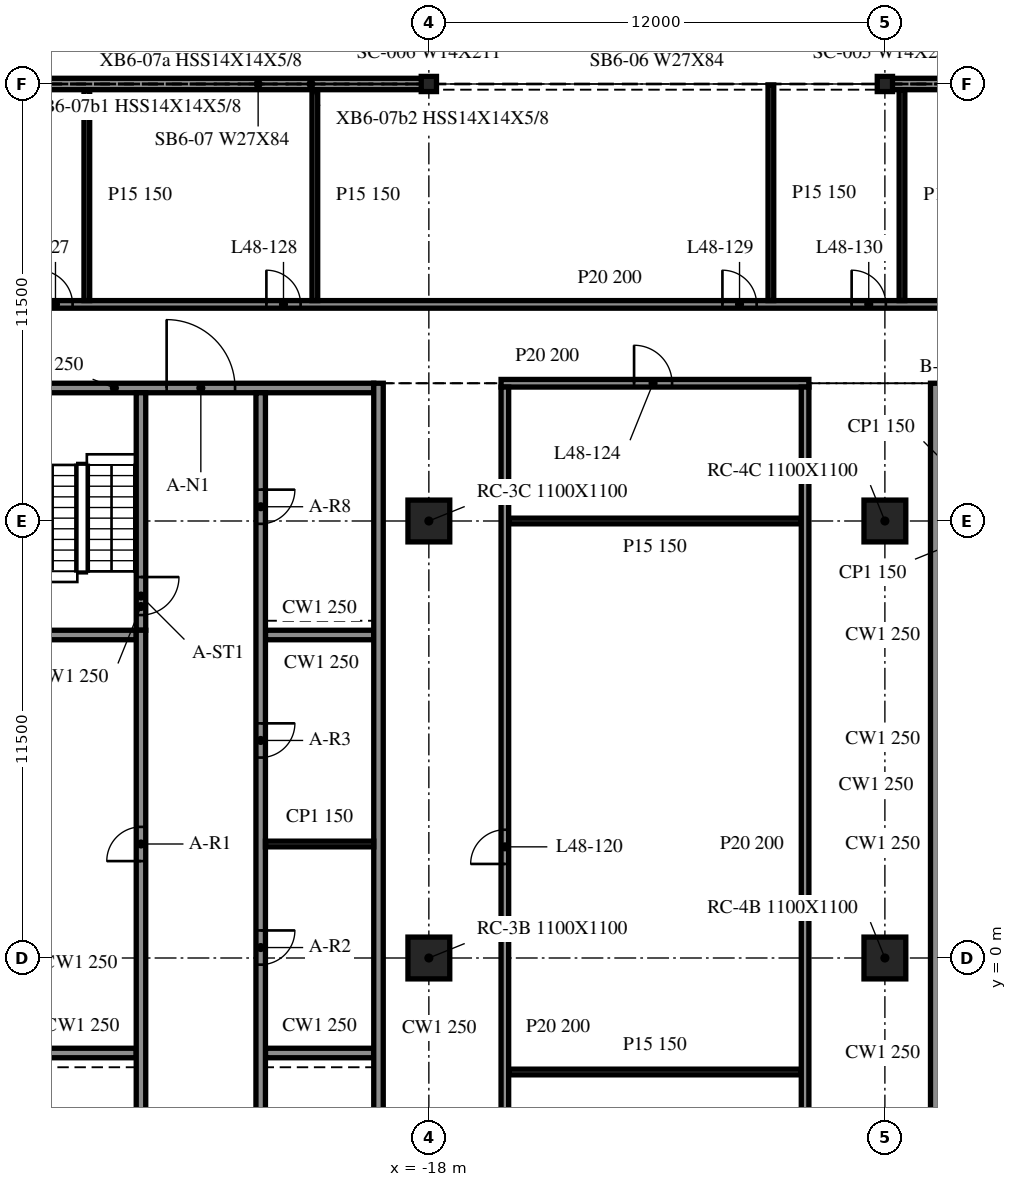
"""IFC4 building model, lengths in metres.
Left out: names, types, materials, properties, quantities, classifications, styles, units other than length and angle.
Written with IfcOpenShell. Run it as: python <this file> out.ifc"""

import sys

from ifc_helpers import new_model, si_unit, direction, frame, frame_2d, origin, origin_2d, place, context, subcontext, project, spatial, rectangle, i_section, extrude, element, fill, save


model = new_model("IFC4")
c1 = context("Model", 3, precision=1e-05, world=origin(), true_north=direction((0.0, 1.0)))
c2 = subcontext(c1, "Body", "Model", "MODEL_VIEW")
j1 = project(units=[si_unit("LENGTHUNIT", "METRE"), si_unit("PLANEANGLEUNIT", "RADIAN")], contexts=[c1])
p1 = place(None, origin())
s1 = spatial("IfcSite", under=j1, at=p1, CompositionType="ELEMENT")
p2 = place(p1, origin())
s2 = spatial("IfcBuilding", under=s1, at=p2, CompositionType="ELEMENT")
p3 = place(p2, frame((0.0, 0.0, 201.5)))
s3 = spatial("IfcBuildingStorey", under=s2, at=p3, CompositionType="ELEMENT", Elevation=201.5)
for number, where, z_axis, x_axis in (
    (1, (-18.0, 0.0, -0.34), (0.0, 0.0, 1.0), (1.0, 0.0, 0.0)),
    (2, (-18.0, 11.5, -0.34), (0.0, 0.0, 1.0), (1.0, 0.0, 0.0)),
    (3, (-6.0, 0.0, -0.34), (0.0, 0.0, 1.0), (1.0, 0.0, 0.0)),
    (4, (-6.0, 11.5, -0.34), (0.0, 0.0, 1.0), (1.0, 0.0, 0.0)),
):
    element("IfcColumn", number, at=place(p3, frame(where, z_axis=z_axis, x_axis=x_axis)), inside=s3, PredefinedType="COLUMN", context=c2, shape_type="SweptSolid", body=[
        extrude(rectangle(XDim=1.1, YDim=1.1, at=origin_2d()), origin(), (0.0, 0.0, 1.0), 3.8),
    ])
for number, where, z_axis, x_axis in (
    (5, (-6.0, 23.0, -0.34), (0.0, 0.0, 1.0), (1.0, 0.0, 0.0)),
    (6, (-18.0, 23.0, -0.34), (0.0, 0.0, 1.0), (1.0, 0.0, 0.0)),
):
    element("IfcColumn", number, at=place(p3, frame(where, z_axis=z_axis, x_axis=x_axis)), inside=s3, PredefinedType="COLUMN", context=c2, shape_type="SweptSolid", body=[
        extrude(i_section(OverallWidth=0.401, OverallDepth=0.399, WebThickness=0.025, FlangeThickness=0.04, at=origin_2d()), origin(), (0.0, 0.0, 1.0), 3.8),
    ])
for number, where, z_axis, x_axis in (
    (7, (5.988, 23.0, 0.0), (0.0, 0.0, 1.0), (-1.0, 0.0, 0.0)),
    (8, (-18.012, 23.0, 0.0), (0.0, 0.0, 1.0), (-1.0, 0.0, 0.0)),
):
    element("IfcWall", number, at=place(p3, frame(where, z_axis=z_axis, x_axis=x_axis)), inside=s3, PredefinedType="NOTDEFINED", context=c2, shape_type="SweptSolid", body=[
        extrude(rectangle(XDim=11.975, YDim=0.3, at=frame_2d((5.988, 0.0))), origin(), (0.0, 0.0, 1.0), 2.782),
    ])
p4 = place(p3, frame((-19.325, -9.125, 0.0), z_axis=(0.0, 0.0, 1.0), x_axis=(0.0, 1.0, 0.0)))
e9 = element("IfcWall", 9, at=p4, inside=s3, PredefinedType="SOLIDWALL", context=c2, shape_type="SweptSolid", body=[
    extrude(rectangle(XDim=24.25, YDim=0.25, at=frame_2d((12.125, 0.0))), origin(), (0.0, 0.0, 1.0), 3.46),
])
p5 = place(p3, frame((-28.55, 15.0, 0.0), z_axis=(0.0, 0.0, 1.0), x_axis=(1.0, 0.0, 0.0)))
e10 = element("IfcWall", 10, at=p5, inside=s3, PredefinedType="SOLIDWALL", context=c2, shape_type="SweptSolid", body=[
    extrude(rectangle(XDim=9.1, YDim=0.25, at=frame_2d((4.55, 0.0))), origin(), (0.0, 0.0, 1.0), 3.46),
])
p6 = place(p5, frame((3.65, 0.0, 0.0)))
e11 = element("IfcOpeningElement", 11, at=p6, cuts=e10, PredefinedType="OPENING", context=c2, shape_type="SweptSolid", body=[
    extrude(rectangle(XDim=1.8, YDim=2.1, at=frame_2d((0.9, 1.05))), frame((0.0, 0.135, 0.0), z_axis=(0.0, -1.0, 0.0), x_axis=(1.0, 0.0, 0.0)), (0.0, 0.0, 1.0), 0.27),
])
p7 = place(p3, frame((-25.575, -8.875, 0.0), z_axis=(0.0, 0.0, 1.0), x_axis=(0.0, 1.0, 0.0)))
e12 = element("IfcWall", 12, at=p7, inside=s3, PredefinedType="SOLIDWALL", context=c2, shape_type="SweptSolid", body=[
    extrude(rectangle(XDim=17.5, YDim=0.25, at=frame_2d((8.75, 0.0))), origin(), (0.0, 0.0, 1.0), 3.46),
])
p8 = place(p7, frame((11.425, 0.0, 0.0)))
e13 = element("IfcOpeningElement", 13, at=p8, cuts=e12, PredefinedType="OPENING", context=c2, shape_type="SweptSolid", body=[
    extrude(rectangle(XDim=0.9, YDim=2.1, at=frame_2d((0.45, 1.05))), frame((0.0, 0.135, 0.0), z_axis=(0.0, -1.0, 0.0), x_axis=(1.0, 0.0, 0.0)), (0.0, 0.0, 1.0), 0.27),
])
p9 = place(p7, frame((0.512, 0.0, 0.0)))
e14 = element("IfcOpeningElement", 14, at=p9, cuts=e12, PredefinedType="OPENING", context=c2, shape_type="SweptSolid", body=[
    extrude(rectangle(XDim=0.9, YDim=2.1, at=frame_2d((0.45, 1.05))), frame((0.0, 0.135, 0.0), z_axis=(0.0, -1.0, 0.0), x_axis=(1.0, 0.0, 0.0)), (0.0, 0.0, 1.0), 0.27),
])
p10 = place(p7, frame((3.587, 0.0, 0.0)))
e15 = element("IfcOpeningElement", 15, at=p10, cuts=e12, PredefinedType="OPENING", context=c2, shape_type="SweptSolid", body=[
    extrude(rectangle(XDim=0.9, YDim=2.1, at=frame_2d((0.45, 1.05))), frame((0.0, 0.135, 0.0), z_axis=(0.0, -1.0, 0.0), x_axis=(1.0, 0.0, 0.0)), (0.0, 0.0, 1.0), 0.27),
])
p11 = place(p3, frame((-25.575, 14.875, 0.0), z_axis=(0.0, 0.0, 1.0), x_axis=(0.0, -1.0, 0.0)))
e16 = element("IfcWall", 16, at=p11, inside=s3, PredefinedType="SOLIDWALL", context=c2, shape_type="SweptSolid", body=[
    extrude(rectangle(XDim=6.25, YDim=0.25, at=frame_2d((3.125, 0.0))), origin(), (0.0, 0.0, 1.0), 3.46),
])
p12 = place(p11, frame((4.85, 0.0, 0.0)))
e17 = element("IfcOpeningElement", 17, at=p12, cuts=e16, PredefinedType="OPENING", context=c2, shape_type="SweptSolid", body=[
    extrude(rectangle(XDim=1.0, YDim=2.1, at=frame_2d((0.5, 1.05))), frame((0.0, 0.135, 0.0), z_axis=(0.0, -1.0, 0.0), x_axis=(1.0, 0.0, 0.0)), (0.0, 0.0, 1.0), 0.27),
])
p13 = place(p3, frame((-22.425, 14.875, 0.0), z_axis=(0.0, 0.0, 1.0), x_axis=(0.0, -1.0, 0.0)))
e18 = element("IfcWall", 18, at=p13, inside=s3, PredefinedType="SOLIDWALL", context=c2, shape_type="SweptSolid", body=[
    extrude(rectangle(XDim=23.75, YDim=0.25, at=frame_2d((11.875, 0.0))), origin(), (0.0, 0.0, 1.0), 3.46),
])
p14 = place(p13, frame((14.15, 0.0, 0.0)))
e19 = element("IfcOpeningElement", 19, at=p14, cuts=e18, PredefinedType="OPENING", context=c2, shape_type="SweptSolid", body=[
    extrude(rectangle(XDim=0.9, YDim=2.1, at=frame_2d((0.45, 1.05))), frame((0.0, 0.135, 0.0), z_axis=(0.0, -1.0, 0.0), x_axis=(1.0, 0.0, 0.0)), (0.0, 0.0, 1.0), 0.27),
])
p15 = place(p13, frame((8.7, 0.0, 0.0)))
e20 = element("IfcOpeningElement", 20, at=p15, cuts=e18, PredefinedType="OPENING", context=c2, shape_type="SweptSolid", body=[
    extrude(rectangle(XDim=0.9, YDim=2.1, at=frame_2d((0.45, 1.05))), frame((0.0, 0.135, 0.0), z_axis=(0.0, -1.0, 0.0), x_axis=(1.0, 0.0, 0.0)), (0.0, 0.0, 1.0), 0.27),
])
p16 = place(p13, frame((22.137, 0.0, 0.0)))
e21 = element("IfcOpeningElement", 21, at=p16, cuts=e18, PredefinedType="OPENING", context=c2, shape_type="SweptSolid", body=[
    extrude(rectangle(XDim=0.9, YDim=2.1, at=frame_2d((0.45, 1.05))), frame((0.0, 0.135, 0.0), z_axis=(0.0, -1.0, 0.0), x_axis=(1.0, 0.0, 0.0)), (0.0, 0.0, 1.0), 0.27),
])
p17 = place(p13, frame((19.062, 0.0, 0.0)))
e22 = element("IfcOpeningElement", 22, at=p17, cuts=e18, PredefinedType="OPENING", context=c2, shape_type="SweptSolid", body=[
    extrude(rectangle(XDim=0.9, YDim=2.1, at=frame_2d((0.45, 1.05))), frame((0.0, 0.135, 0.0), z_axis=(0.0, -1.0, 0.0), x_axis=(1.0, 0.0, 0.0)), (0.0, 0.0, 1.0), 0.27),
])
p18 = place(p13, frame((2.55, 0.0, 0.0)))
e23 = element("IfcOpeningElement", 23, at=p18, cuts=e18, PredefinedType="OPENING", context=c2, shape_type="SweptSolid", body=[
    extrude(rectangle(XDim=0.9, YDim=2.1, at=frame_2d((0.45, 1.05))), frame((0.0, 0.135, 0.0), z_axis=(0.0, -1.0, 0.0), x_axis=(1.0, 0.0, 0.0)), (0.0, 0.0, 1.0), 0.27),
])
for number, where, z_axis, x_axis in (
    (24, (-28.55, -2.5, 0.0), (0.0, 0.0, 1.0), (1.0, 0.0, 0.0)),
    (25, (-28.55, 8.5, 0.0), (0.0, 0.0, 1.0), (1.0, 0.0, 0.0)),
    (26, (-22.3, -2.5, 0.0), (0.0, 0.0, 1.0), (1.0, 0.0, 0.0)),
    (27, (-22.3, 8.5, 0.0), (0.0, 0.0, 1.0), (1.0, 0.0, 0.0)),
):
    element("IfcWall", number, at=place(p3, frame(where, z_axis=z_axis, x_axis=x_axis)), inside=s3, PredefinedType="SOLIDWALL", context=c2, shape_type="SweptSolid", body=[
        extrude(rectangle(XDim=2.85, YDim=0.25, at=frame_2d((1.425, 0.0))), origin(), (0.0, 0.0, 1.0), 3.46),
    ])
p19 = place(p3, frame((-22.3, 3.0, 0.0), z_axis=(0.0, 0.0, 1.0), x_axis=(1.0, 0.0, 0.0)))
e28 = element("IfcWall", 28, at=p19, inside=s3, PredefinedType="PARTITIONING", context=c2, shape_type="SweptSolid", body=[
    extrude(rectangle(XDim=2.85, YDim=0.15, at=frame_2d((1.425, 0.0))), origin(), (0.0, 0.0, 1.0), 3.46),
])
p20 = place(p3, frame((-4.675, 15.125, 0.0), z_axis=(0.0, 0.0, 1.0), x_axis=(0.0, -1.0, 0.0)))
e29 = element("IfcWall", 29, at=p20, inside=s3, PredefinedType="SOLIDWALL", context=c2, shape_type="SweptSolid", body=[
    extrude(rectangle(XDim=24.25, YDim=0.25, at=frame_2d((12.125, 0.0))), origin(), (0.0, 0.0, 1.0), 3.46),
])
for number, where, z_axis, x_axis in (
    (30, (-15.9, -3.0, 0.0), (0.0, 0.0, 1.0), (1.0, 0.0, 0.0)),
    (31, (-15.9, 11.5, 0.0), (0.0, 0.0, 1.0), (1.0, 0.0, 0.0)),
):
    element("IfcWall", number, at=place(p3, frame(where, z_axis=z_axis, x_axis=x_axis)), inside=s3, PredefinedType="PARTITIONING", context=c2, shape_type="SweptSolid", body=[
        extrude(rectangle(XDim=7.7, YDim=0.15, at=frame_2d((3.85, 0.0))), origin(), (0.0, 0.0, 1.0), 3.46),
    ])
p21 = place(p3, frame((-16.1, 15.125, 0.0), z_axis=(0.0, 0.0, 1.0), x_axis=(1.0, 0.0, 0.0)))
e32 = element("IfcWall", 32, at=p21, inside=s3, PredefinedType="PARTITIONING", context=c2, shape_type="SweptSolid", body=[
    extrude(rectangle(XDim=8.1, YDim=0.2, at=frame_2d((4.05, 0.0))), origin(), (0.0, 0.0, 1.0), 3.46),
])
p22 = place(p21, frame((3.5, 0.0, 0.0)))
e33 = element("IfcOpeningElement", 33, at=p22, cuts=e32, PredefinedType="OPENING", context=c2, shape_type="SweptSolid", body=[
    extrude(rectangle(XDim=1.0, YDim=2.1, at=frame_2d((0.5, 1.05))), frame((0.0, 0.11, 0.0), z_axis=(0.0, -1.0, 0.0), x_axis=(1.0, 0.0, 0.0)), (0.0, 0.0, 1.0), 0.22),
])
p23 = place(p3, frame((-41.975, 17.2, 0.0), z_axis=(0.0, 0.0, 1.0), x_axis=(1.0, 0.0, 0.0)))
e34 = element("IfcWall", 34, at=p23, inside=s3, PredefinedType="PARTITIONING", context=c2, shape_type="SweptSolid", body=[
    extrude(rectangle(XDim=95.782, YDim=0.2, at=frame_2d((47.891, 0.0))), origin(), (0.0, 0.0, 1.0), 3.46),
])
p24 = place(p23, frame((7.7, 0.0, 0.0)))
e35 = element("IfcOpeningElement", 35, at=p24, cuts=e34, PredefinedType="OPENING", context=c2, shape_type="SweptSolid", body=[
    extrude(rectangle(XDim=0.9, YDim=2.1, at=frame_2d((0.45, 1.05))), frame((0.0, 0.11, 0.0), z_axis=(0.0, -1.0, 0.0), x_axis=(1.0, 0.0, 0.0)), (0.0, 0.0, 1.0), 0.22),
])
p25 = place(p23, frame((13.7, 0.0, 0.0)))
e36 = element("IfcOpeningElement", 36, at=p25, cuts=e34, PredefinedType="OPENING", context=c2, shape_type="SweptSolid", body=[
    extrude(rectangle(XDim=0.9, YDim=2.1, at=frame_2d((0.45, 1.05))), frame((0.0, 0.11, 0.0), z_axis=(0.0, -1.0, 0.0), x_axis=(1.0, 0.0, 0.0)), (0.0, 0.0, 1.0), 0.22),
])
p26 = place(p23, frame((19.7, 0.0, 0.0)))
e37 = element("IfcOpeningElement", 37, at=p26, cuts=e34, PredefinedType="OPENING", context=c2, shape_type="SweptSolid", body=[
    extrude(rectangle(XDim=0.9, YDim=2.1, at=frame_2d((0.45, 1.05))), frame((0.0, 0.11, 0.0), z_axis=(0.0, -1.0, 0.0), x_axis=(1.0, 0.0, 0.0)), (0.0, 0.0, 1.0), 0.22),
])
p27 = place(p23, frame((31.7, 0.0, 0.0)))
e38 = element("IfcOpeningElement", 38, at=p27, cuts=e34, PredefinedType="OPENING", context=c2, shape_type="SweptSolid", body=[
    extrude(rectangle(XDim=0.9, YDim=2.1, at=frame_2d((0.45, 1.05))), frame((0.0, 0.11, 0.0), z_axis=(0.0, -1.0, 0.0), x_axis=(1.0, 0.0, 0.0)), (0.0, 0.0, 1.0), 0.22),
])
p28 = place(p23, frame((35.1, 0.0, 0.0)))
e39 = element("IfcOpeningElement", 39, at=p28, cuts=e34, PredefinedType="OPENING", context=c2, shape_type="SweptSolid", body=[
    extrude(rectangle(XDim=0.9, YDim=2.1, at=frame_2d((0.45, 1.05))), frame((0.0, 0.11, 0.0), z_axis=(0.0, -1.0, 0.0), x_axis=(1.0, 0.0, 0.0)), (0.0, 0.0, 1.0), 0.22),
])
p29 = place(p23, frame((43.7, 0.0, 0.0)))
e40 = element("IfcOpeningElement", 40, at=p29, cuts=e34, PredefinedType="OPENING", context=c2, shape_type="SweptSolid", body=[
    extrude(rectangle(XDim=0.9, YDim=2.1, at=frame_2d((0.45, 1.05))), frame((0.0, 0.11, 0.0), z_axis=(0.0, -1.0, 0.0), x_axis=(1.0, 0.0, 0.0)), (0.0, 0.0, 1.0), 0.22),
])
p30 = place(p23, frame((47.3, 0.0, 0.0)))
e41 = element("IfcOpeningElement", 41, at=p30, cuts=e34, PredefinedType="OPENING", context=c2, shape_type="SweptSolid", body=[
    extrude(rectangle(XDim=0.9, YDim=2.1, at=frame_2d((0.45, 1.05))), frame((0.0, 0.11, 0.0), z_axis=(0.0, -1.0, 0.0), x_axis=(1.0, 0.0, 0.0)), (0.0, 0.0, 1.0), 0.22),
])
p31 = place(p23, frame((51.5, 0.0, 0.0)))
e42 = element("IfcOpeningElement", 42, at=p31, cuts=e34, PredefinedType="OPENING", context=c2, shape_type="SweptSolid", body=[
    extrude(rectangle(XDim=0.9, YDim=2.1, at=frame_2d((0.45, 1.05))), frame((0.0, 0.11, 0.0), z_axis=(0.0, -1.0, 0.0), x_axis=(1.0, 0.0, 0.0)), (0.0, 0.0, 1.0), 0.22),
])
p32 = place(p23, frame((57.1, 0.0, 0.0)))
e43 = element("IfcOpeningElement", 43, at=p32, cuts=e34, PredefinedType="OPENING", context=c2, shape_type="SweptSolid", body=[
    extrude(rectangle(XDim=0.9, YDim=2.1, at=frame_2d((0.45, 1.05))), frame((0.0, 0.11, 0.0), z_axis=(0.0, -1.0, 0.0), x_axis=(1.0, 0.0, 0.0)), (0.0, 0.0, 1.0), 0.22),
])
p33 = place(p23, frame((69.1, 0.0, 0.0)))
e44 = element("IfcOpeningElement", 44, at=p33, cuts=e34, PredefinedType="OPENING", context=c2, shape_type="SweptSolid", body=[
    extrude(rectangle(XDim=0.9, YDim=2.1, at=frame_2d((0.45, 1.05))), frame((0.0, 0.11, 0.0), z_axis=(0.0, -1.0, 0.0), x_axis=(1.0, 0.0, 0.0)), (0.0, 0.0, 1.0), 0.22),
])
p34 = place(p23, frame((72.5, 0.0, 0.0)))
e45 = element("IfcOpeningElement", 45, at=p34, cuts=e34, PredefinedType="OPENING", context=c2, shape_type="SweptSolid", body=[
    extrude(rectangle(XDim=0.9, YDim=2.1, at=frame_2d((0.45, 1.05))), frame((0.0, 0.11, 0.0), z_axis=(0.0, -1.0, 0.0), x_axis=(1.0, 0.0, 0.0)), (0.0, 0.0, 1.0), 0.22),
])
p35 = place(p23, frame((81.1, 0.0, 0.0)))
e46 = element("IfcOpeningElement", 46, at=p35, cuts=e34, PredefinedType="OPENING", context=c2, shape_type="SweptSolid", body=[
    extrude(rectangle(XDim=0.9, YDim=2.1, at=frame_2d((0.45, 1.05))), frame((0.0, 0.11, 0.0), z_axis=(0.0, -1.0, 0.0), x_axis=(1.0, 0.0, 0.0)), (0.0, 0.0, 1.0), 0.22),
])
p36 = place(p23, frame((87.1, 0.0, 0.0)))
e47 = element("IfcOpeningElement", 47, at=p36, cuts=e34, PredefinedType="OPENING", context=c2, shape_type="SweptSolid", body=[
    extrude(rectangle(XDim=0.9, YDim=2.1, at=frame_2d((0.45, 1.05))), frame((0.0, 0.11, 0.0), z_axis=(0.0, -1.0, 0.0), x_axis=(1.0, 0.0, 0.0)), (0.0, 0.0, 1.0), 0.22),
])
for number, where, z_axis, x_axis in (
    (48, (-27.0, 17.3, 0.0), (0.0, 0.0, 1.0), (0.0, 1.0, 0.0)),
    (49, (-21.0, 17.3, 0.0), (0.0, 0.0, 1.0), (0.0, 1.0, 0.0)),
):
    element("IfcWall", number, at=place(p3, frame(where, z_axis=z_axis, x_axis=x_axis)), inside=s3, PredefinedType="PARTITIONING", context=c2, shape_type="SweptSolid", body=[
        extrude(rectangle(XDim=5.55, YDim=0.15, at=frame_2d((2.775, 0.0))), origin(), (0.0, 0.0, 1.0), 3.46),
    ])
p37 = place(p3, frame((-16.0, -9.025, 0.0), z_axis=(0.0, 0.0, 1.0), x_axis=(0.0, 1.0, 0.0)))
e50 = element("IfcWall", 50, at=p37, inside=s3, PredefinedType="PARTITIONING", context=c2, shape_type="SweptSolid", body=[
    extrude(rectangle(XDim=24.05, YDim=0.2, at=frame_2d((12.025, 0.0))), origin(), (0.0, 0.0, 1.0), 3.46),
])
p38 = place(p37, frame((11.5, 0.0, 0.0)))
e51 = element("IfcOpeningElement", 51, at=p38, cuts=e50, PredefinedType="OPENING", context=c2, shape_type="SweptSolid", body=[
    extrude(rectangle(XDim=0.9, YDim=2.1, at=frame_2d((0.45, 1.05))), frame((0.0, 0.11, 0.0), z_axis=(0.0, -1.0, 0.0), x_axis=(1.0, 0.0, 0.0)), (0.0, 0.0, 1.0), 0.22),
])
p39 = place(p3, frame((-9.0, 17.3, 0.0), z_axis=(0.0, 0.0, 1.0), x_axis=(0.0, 1.0, 0.0)))
e52 = element("IfcWall", 52, at=p39, inside=s3, PredefinedType="PARTITIONING", context=c2, shape_type="SweptSolid", body=[
    extrude(rectangle(XDim=5.675, YDim=0.15, at=frame_2d((2.837, 0.0))), origin(), (0.0, 0.0, 1.0), 3.46),
])
p40 = place(p3, frame((-8.1, -9.025, 0.0), z_axis=(0.0, 0.0, 1.0), x_axis=(0.0, 1.0, 0.0)))
e53 = element("IfcWall", 53, at=p40, inside=s3, PredefinedType="PARTITIONING", context=c2, shape_type="SweptSolid", body=[
    extrude(rectangle(XDim=24.05, YDim=0.2, at=frame_2d((12.025, 0.0))), origin(), (0.0, 0.0, 1.0), 3.46),
])
p41 = place(p3, frame((-5.55, 17.3, 0.0), z_axis=(0.0, 0.0, 1.0), x_axis=(0.0, 1.0, 0.0)))
e54 = element("IfcWall", 54, at=p41, inside=s3, PredefinedType="PARTITIONING", context=c2, shape_type="SweptSolid", body=[
    extrude(rectangle(XDim=5.55, YDim=0.15, at=frame_2d((2.775, 0.0))), origin(), (0.0, 0.0, 1.0), 3.46),
])
p42 = place(p6, origin())
e55 = element("IfcDoor", 55, at=p42, inside=s3, OperationType="DOUBLE_DOOR_SINGLE_SWING", PredefinedType="DOOR", context=c2, shape_type="SweptSolid", body=[
    extrude(rectangle(XDim=1.8, YDim=2.1, at=frame_2d((0.9, 1.05))), frame((0.0, 0.025, 0.0), z_axis=(0.0, -1.0, 0.0), x_axis=(1.0, 0.0, 0.0)), (0.0, 0.0, 1.0), 0.05),
])
fill(e11, e55)
p43 = place(p8, origin())
e56 = element("IfcDoor", 56, at=p43, inside=s3, OperationType="SINGLE_SWING_LEFT", PredefinedType="DOOR", context=c2, shape_type="SweptSolid", body=[
    extrude(rectangle(XDim=0.9, YDim=2.1, at=frame_2d((0.45, 1.05))), frame((0.0, 0.025, 0.0), z_axis=(0.0, -1.0, 0.0), x_axis=(1.0, 0.0, 0.0)), (0.0, 0.0, 1.0), 0.05),
])
fill(e13, e56)
p44 = place(p14, origin())
e57 = element("IfcDoor", 57, at=p44, inside=s3, OperationType="SINGLE_SWING_RIGHT", PredefinedType="DOOR", context=c2, shape_type="SweptSolid", body=[
    extrude(rectangle(XDim=0.9, YDim=2.1, at=frame_2d((0.45, 1.05))), frame((0.0, 0.025, 0.0), z_axis=(0.0, -1.0, 0.0), x_axis=(1.0, 0.0, 0.0)), (0.0, 0.0, 1.0), 0.05),
])
fill(e19, e57)
p45 = place(p15, origin())
e58 = element("IfcDoor", 58, at=p45, inside=s3, OperationType="SINGLE_SWING_LEFT", PredefinedType="DOOR", context=c2, shape_type="SweptSolid", body=[
    extrude(rectangle(XDim=0.9, YDim=2.1, at=frame_2d((0.45, 1.05))), frame((0.0, 0.025, 0.0), z_axis=(0.0, -1.0, 0.0), x_axis=(1.0, 0.0, 0.0)), (0.0, 0.0, 1.0), 0.05),
])
fill(e20, e58)
p46 = place(p18, origin())
e59 = element("IfcDoor", 59, at=p46, inside=s3, OperationType="SINGLE_SWING_RIGHT", PredefinedType="DOOR", context=c2, shape_type="SweptSolid", body=[
    extrude(rectangle(XDim=0.9, YDim=2.1, at=frame_2d((0.45, 1.05))), frame((0.0, 0.025, 0.0), z_axis=(0.0, -1.0, 0.0), x_axis=(1.0, 0.0, 0.0)), (0.0, 0.0, 1.0), 0.05),
])
fill(e23, e59)
p47 = place(p12, origin())
e60 = element("IfcDoor", 60, at=p47, inside=s3, OperationType="SINGLE_SWING_LEFT", PredefinedType="DOOR", context=c2, shape_type="SweptSolid", body=[
    extrude(rectangle(XDim=1.0, YDim=2.1, at=frame_2d((0.5, 1.05))), frame((0.0, 0.025, 0.0), z_axis=(0.0, -1.0, 0.0), x_axis=(1.0, 0.0, 0.0)), (0.0, 0.0, 1.0), 0.05),
])
fill(e17, e60)
p48 = place(p38, origin())
e61 = element("IfcDoor", 61, at=p48, inside=s3, OperationType="SINGLE_SWING_RIGHT", PredefinedType="DOOR", context=c2, shape_type="SweptSolid", body=[
    extrude(rectangle(XDim=0.9, YDim=2.1, at=frame_2d((0.45, 1.05))), frame((0.0, 0.025, 0.0), z_axis=(0.0, -1.0, 0.0), x_axis=(1.0, 0.0, 0.0)), (0.0, 0.0, 1.0), 0.05),
])
fill(e51, e61)
p49 = place(p22, origin())
e62 = element("IfcDoor", 62, at=p49, inside=s3, OperationType="SINGLE_SWING_RIGHT", PredefinedType="DOOR", context=c2, shape_type="SweptSolid", body=[
    extrude(rectangle(XDim=1.0, YDim=2.1, at=frame_2d((0.5, 1.05))), frame((0.0, 0.025, 0.0), z_axis=(0.0, -1.0, 0.0), x_axis=(1.0, 0.0, 0.0)), (0.0, 0.0, 1.0), 0.05),
])
fill(e33, e62)
p50 = place(p25, origin())
e63 = element("IfcDoor", 63, at=p50, inside=s3, OperationType="SINGLE_SWING_LEFT", PredefinedType="DOOR", context=c2, shape_type="SweptSolid", body=[
    extrude(rectangle(XDim=0.9, YDim=2.1, at=frame_2d((0.45, 1.05))), frame((0.0, 0.025, 0.0), z_axis=(0.0, -1.0, 0.0), x_axis=(1.0, 0.0, 0.0)), (0.0, 0.0, 1.0), 0.05),
])
fill(e36, e63)
p51 = place(p26, origin())
e64 = element("IfcDoor", 64, at=p51, inside=s3, OperationType="SINGLE_SWING_LEFT", PredefinedType="DOOR", context=c2, shape_type="SweptSolid", body=[
    extrude(rectangle(XDim=0.9, YDim=2.1, at=frame_2d((0.45, 1.05))), frame((0.0, 0.025, 0.0), z_axis=(0.0, -1.0, 0.0), x_axis=(1.0, 0.0, 0.0)), (0.0, 0.0, 1.0), 0.05),
])
fill(e37, e64)
p52 = place(p27, origin())
e65 = element("IfcDoor", 65, at=p52, inside=s3, OperationType="SINGLE_SWING_LEFT", PredefinedType="DOOR", context=c2, shape_type="SweptSolid", body=[
    extrude(rectangle(XDim=0.9, YDim=2.1, at=frame_2d((0.45, 1.05))), frame((0.0, 0.025, 0.0), z_axis=(0.0, -1.0, 0.0), x_axis=(1.0, 0.0, 0.0)), (0.0, 0.0, 1.0), 0.05),
])
fill(e38, e65)
p53 = place(p28, origin())
e66 = element("IfcDoor", 66, at=p53, inside=s3, OperationType="SINGLE_SWING_LEFT", PredefinedType="DOOR", context=c2, shape_type="SweptSolid", body=[
    extrude(rectangle(XDim=0.9, YDim=2.1, at=frame_2d((0.45, 1.05))), frame((0.0, 0.025, 0.0), z_axis=(0.0, -1.0, 0.0), x_axis=(1.0, 0.0, 0.0)), (0.0, 0.0, 1.0), 0.05),
])
fill(e39, e66)
save(model, sys.argv[1])
